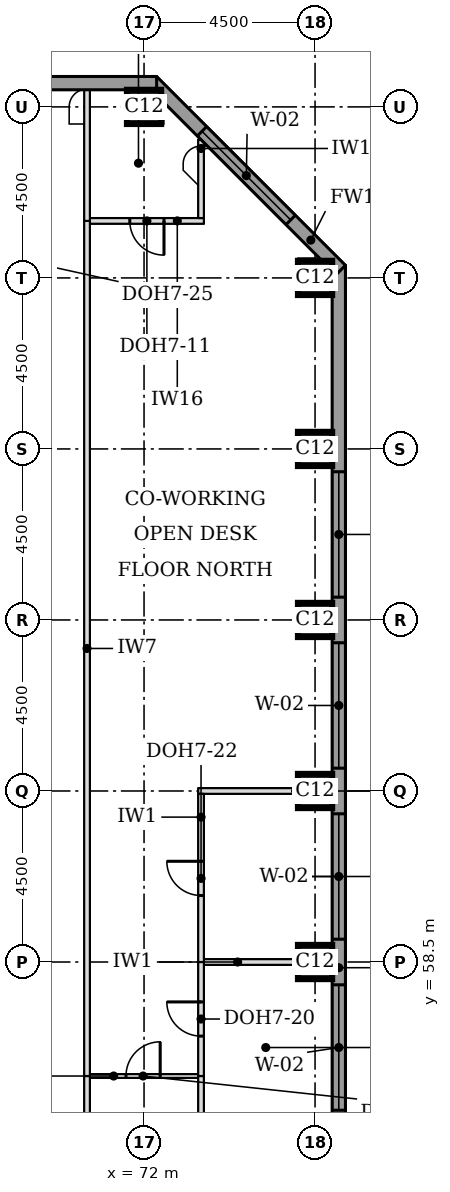
"""IFC4 building model, lengths in metres.
Left out: names, types, materials, properties, quantities, classifications, styles, units other than length and angle.
Written with IfcOpenShell. Run it as: python <this file> out.ifc"""

import sys

from ifc_helpers import new_model, si_unit, direction, frame, frame_2d, origin, origin_2d, place, context, subcontext, project, spatial, rectangle, extrude, element, fill, save


model = new_model("IFC4")
c1 = context("Model", 3, precision=1e-05, world=origin(), true_north=direction((0.0, 1.0)))
c2 = subcontext(c1, "Body", "Model", "MODEL_VIEW")
j1 = project(units=[si_unit("LENGTHUNIT", "METRE"), si_unit("PLANEANGLEUNIT", "RADIAN")], contexts=[c1])
p1 = place(None, origin())
s1 = spatial("IfcSite", under=j1, at=p1, CompositionType="ELEMENT")
p2 = place(p1, origin())
s2 = spatial("IfcBuilding", under=s1, at=p2, CompositionType="ELEMENT")
p3 = place(p2, frame((0.0, 0.0, 192.1)))
s3 = spatial("IfcBuildingStorey", under=s2, at=p3, CompositionType="ELEMENT", Elevation=192.1)
for number, where, z_axis, x_axis in (
    (1, (76.5, 58.5, 0.0), (0.0, 0.0, 1.0), (1.0, 0.0, 0.0)),
    (2, (76.5, 63.0, 0.0), (0.0, 0.0, 1.0), (1.0, 0.0, 0.0)),
    (3, (76.5, 67.5, 0.0), (0.0, 0.0, 1.0), (1.0, 0.0, 0.0)),
    (4, (76.5, 72.0, 0.0), (0.0, 0.0, 1.0), (1.0, 0.0, 0.0)),
    (5, (76.5, 76.5, 0.0), (0.0, 0.0, 1.0), (1.0, 0.0, 0.0)),
    (6, (72.0, 81.0, 0.0), (0.0, 0.0, 1.0), (1.0, 0.0, 0.0)),
):
    element("IfcColumn", number, at=place(p3, frame(where, z_axis=z_axis, x_axis=x_axis)), inside=s3, PredefinedType="COLUMN", context=c2, shape_type="SweptSolid", body=[
        extrude(rectangle(XDim=0.9, YDim=0.9, at=origin_2d()), origin(), (0.0, 0.0, 1.0), 3.7),
    ])
p4 = place(p3, frame((77.125, 44.669, 0.0), z_axis=(0.0, 0.0, 1.0), x_axis=(0.0, 1.0, 0.0)))
e7 = element("IfcWall", 7, at=p4, inside=s3, PredefinedType="STANDARD", context=c2, shape_type="SweptSolid", body=[
    extrude(rectangle(XDim=32.163, YDim=0.35, at=frame_2d((16.081, 0.0))), origin(), (0.0, 0.0, 1.0), 3.525),
])
p5 = place(p4, frame((5.431, 0.0, 0.9)))
e8 = element("IfcOpeningElement", 8, at=p5, cuts=e7, PredefinedType="OPENING", context=c2, shape_type="SweptSolid", body=[
    extrude(rectangle(XDim=3.3, YDim=1.9, at=frame_2d((1.65, 0.95))), frame((0.0, 0.185, 0.0), z_axis=(0.0, -1.0, 0.0), x_axis=(1.0, 0.0, 0.0)), (0.0, 0.0, 1.0), 0.37),
])
p6 = place(p4, frame((9.931, 0.0, 0.9)))
e9 = element("IfcOpeningElement", 9, at=p6, cuts=e7, PredefinedType="OPENING", context=c2, shape_type="SweptSolid", body=[
    extrude(rectangle(XDim=3.3, YDim=1.9, at=frame_2d((1.65, 0.95))), frame((0.0, 0.185, 0.0), z_axis=(0.0, -1.0, 0.0), x_axis=(1.0, 0.0, 0.0)), (0.0, 0.0, 1.0), 0.37),
])
p7 = place(p4, frame((14.431, 0.0, 0.9)))
e10 = element("IfcOpeningElement", 10, at=p7, cuts=e7, PredefinedType="OPENING", context=c2, shape_type="SweptSolid", body=[
    extrude(rectangle(XDim=3.3, YDim=1.9, at=frame_2d((1.65, 0.95))), frame((0.0, 0.185, 0.0), z_axis=(0.0, -1.0, 0.0), x_axis=(1.0, 0.0, 0.0)), (0.0, 0.0, 1.0), 0.37),
])
p8 = place(p4, frame((18.931, 0.0, 0.9)))
e11 = element("IfcOpeningElement", 11, at=p8, cuts=e7, PredefinedType="OPENING", context=c2, shape_type="SweptSolid", body=[
    extrude(rectangle(XDim=3.3, YDim=1.9, at=frame_2d((1.65, 0.95))), frame((0.0, 0.185, 0.0), z_axis=(0.0, -1.0, 0.0), x_axis=(1.0, 0.0, 0.0)), (0.0, 0.0, 1.0), 0.37),
])
p9 = place(p4, frame((23.431, 0.0, 0.9)))
e12 = element("IfcOpeningElement", 12, at=p9, cuts=e7, PredefinedType="OPENING", context=c2, shape_type="SweptSolid", body=[
    extrude(rectangle(XDim=3.3, YDim=1.9, at=frame_2d((1.65, 0.95))), frame((0.0, 0.185, 0.0), z_axis=(0.0, -1.0, 0.0), x_axis=(1.0, 0.0, 0.0)), (0.0, 0.0, 1.0), 0.37),
])
p10 = place(p3, frame((77.176, 76.708, 0.0), z_axis=(0.0, 0.0, 1.0), x_axis=(-0.707106781187, 0.707106781187, 0.0)))
e13 = element("IfcWall", 13, at=p10, inside=s3, PredefinedType="STANDARD", context=c2, shape_type="SweptSolid", body=[
    extrude(rectangle(XDim=7.027, YDim=0.35, at=frame_2d((3.513, 0.0))), origin(), (0.0, 0.0, 1.0), 3.525),
])
p11 = place(p10, frame((1.863, 0.0, 0.9)))
e14 = element("IfcOpeningElement", 14, at=p11, cuts=e13, PredefinedType="OPENING", context=c2, shape_type="SweptSolid", body=[
    extrude(rectangle(XDim=3.3, YDim=1.9, at=frame_2d((1.65, 0.95))), frame((0.0, 0.185, 0.0), z_axis=(0.0, -1.0, 0.0), x_axis=(1.0, 0.0, 0.0)), (0.0, 0.0, 1.0), 0.37),
])
p12 = place(p3, frame((72.331, 81.625, 0.0), z_axis=(0.0, 0.0, 1.0), x_axis=(-1.0, 0.0, 0.0)))
e15 = element("IfcWall", 15, at=p12, inside=s3, PredefinedType="STANDARD", context=c2, shape_type="SweptSolid", body=[
    extrude(rectangle(XDim=32.163, YDim=0.35, at=frame_2d((16.081, 0.0))), origin(), (0.0, 0.0, 1.0), 3.525),
])
p13 = place(p12, frame((5.431, 0.0, 0.9)))
e16 = element("IfcOpeningElement", 16, at=p13, cuts=e15, PredefinedType="OPENING", context=c2, shape_type="SweptSolid", body=[
    extrude(rectangle(XDim=3.3, YDim=1.9, at=frame_2d((1.65, 0.95))), frame((0.0, 0.185, 0.0), z_axis=(0.0, -1.0, 0.0), x_axis=(1.0, 0.0, 0.0)), (0.0, 0.0, 1.0), 0.37),
])
p14 = place(p12, frame((9.931, 0.0, 0.9)))
e17 = element("IfcOpeningElement", 17, at=p14, cuts=e15, PredefinedType="OPENING", context=c2, shape_type="SweptSolid", body=[
    extrude(rectangle(XDim=3.3, YDim=1.9, at=frame_2d((1.65, 0.95))), frame((0.0, 0.185, 0.0), z_axis=(0.0, -1.0, 0.0), x_axis=(1.0, 0.0, 0.0)), (0.0, 0.0, 1.0), 0.37),
])
p15 = place(p12, frame((14.431, 0.0, 0.9)))
e18 = element("IfcOpeningElement", 18, at=p15, cuts=e15, PredefinedType="OPENING", context=c2, shape_type="SweptSolid", body=[
    extrude(rectangle(XDim=3.3, YDim=1.9, at=frame_2d((1.65, 0.95))), frame((0.0, 0.185, 0.0), z_axis=(0.0, -1.0, 0.0), x_axis=(1.0, 0.0, 0.0)), (0.0, 0.0, 1.0), 0.37),
])
p16 = place(p12, frame((18.931, 0.0, 0.9)))
e19 = element("IfcOpeningElement", 19, at=p16, cuts=e15, PredefinedType="OPENING", context=c2, shape_type="SweptSolid", body=[
    extrude(rectangle(XDim=3.3, YDim=1.9, at=frame_2d((1.65, 0.95))), frame((0.0, 0.185, 0.0), z_axis=(0.0, -1.0, 0.0), x_axis=(1.0, 0.0, 0.0)), (0.0, 0.0, 1.0), 0.37),
])
p17 = place(p12, frame((23.431, 0.0, 0.9)))
e20 = element("IfcOpeningElement", 20, at=p17, cuts=e15, PredefinedType="OPENING", context=c2, shape_type="SweptSolid", body=[
    extrude(rectangle(XDim=3.3, YDim=1.9, at=frame_2d((1.65, 0.95))), frame((0.0, 0.185, 0.0), z_axis=(0.0, -1.0, 0.0), x_axis=(1.0, 0.0, 0.0)), (0.0, 0.0, 1.0), 0.37),
])
p18 = place(p3, frame((70.575, 55.5, 0.0), z_axis=(0.0, 0.0, 1.0), x_axis=(1.0, 0.0, 0.0)))
e21 = element("IfcWall", 21, at=p18, inside=s3, PredefinedType="PARTITIONING", context=c2, shape_type="SweptSolid", body=[
    extrude(rectangle(XDim=2.85, YDim=0.1, at=frame_2d((1.425, 0.0))), origin(), (0.0, 0.0, 1.0), 3.55),
])
p19 = place(p18, frame((0.95, 0.0, 0.0)))
e22 = element("IfcOpeningElement", 22, at=p19, cuts=e21, PredefinedType="OPENING", context=c2, shape_type="SweptSolid", body=[
    extrude(rectangle(XDim=0.9, YDim=2.1, at=frame_2d((0.45, 1.05))), frame((0.0, 0.06, 0.0), z_axis=(0.0, -1.0, 0.0), x_axis=(1.0, 0.0, 0.0)), (0.0, 0.0, 1.0), 0.12),
])
p20 = place(p3, frame((73.575, 58.5, 0.0), z_axis=(0.0, 0.0, 1.0), x_axis=(1.0, 0.0, 0.0)))
e23 = element("IfcWall", 23, at=p20, inside=s3, PredefinedType="PARTITIONING", context=c2, shape_type="SweptSolid", body=[
    extrude(rectangle(XDim=3.375, YDim=0.15, at=frame_2d((1.688, 0.0))), origin(), (0.0, 0.0, 1.0), 3.55),
])
p21 = place(p3, frame((73.425, 63.0, 0.0), z_axis=(0.0, 0.0, 1.0), x_axis=(1.0, 0.0, 0.0)))
e24 = element("IfcWall", 24, at=p21, inside=s3, PredefinedType="PARTITIONING", context=c2, shape_type="SweptSolid", body=[
    extrude(rectangle(XDim=3.525, YDim=0.15, at=frame_2d((1.762, 0.0))), origin(), (0.0, 0.0, 1.0), 3.55),
])
p22 = place(p3, frame((70.575, 78.0, 0.0), z_axis=(0.0, 0.0, 1.0), x_axis=(1.0, 0.0, 0.0)))
e25 = element("IfcWall", 25, at=p22, inside=s3, PredefinedType="PARTITIONING", context=c2, shape_type="SweptSolid", body=[
    extrude(rectangle(XDim=3.0, YDim=0.15, at=frame_2d((1.5, 0.0))), origin(), (0.0, 0.0, 1.0), 3.55),
])
p23 = place(p22, frame((1.05, 0.0, 0.0)))
e26 = element("IfcOpeningElement", 26, at=p23, cuts=e25, PredefinedType="OPENING", context=c2, shape_type="SweptSolid", body=[
    extrude(rectangle(XDim=0.9, YDim=2.1, at=frame_2d((0.45, 1.05))), frame((0.0, 0.085, 0.0), z_axis=(0.0, -1.0, 0.0), x_axis=(1.0, 0.0, 0.0)), (0.0, 0.0, 1.0), 0.17),
])
p24 = place(p3, frame((70.5, 51.0, 0.0), z_axis=(0.0, 0.0, 1.0), x_axis=(0.0, 1.0, 0.0)))
e27 = element("IfcWall", 27, at=p24, inside=s3, PredefinedType="PARTITIONING", context=c2, shape_type="SweptSolid", body=[
    extrude(rectangle(XDim=4.5, YDim=0.15, at=frame_2d((2.25, 0.0))), origin(), (0.0, 0.0, 1.0), 3.55),
])
p25 = place(p24, frame((1.75, 0.0, 0.0)))
e28 = element("IfcOpeningElement", 28, at=p25, cuts=e27, PredefinedType="OPENING", context=c2, shape_type="SweptSolid", body=[
    extrude(rectangle(XDim=1.0, YDim=2.1, at=frame_2d((0.5, 1.05))), frame((0.0, 0.085, 0.0), z_axis=(0.0, -1.0, 0.0), x_axis=(1.0, 0.0, 0.0)), (0.0, 0.0, 1.0), 0.17),
])
p26 = place(p3, frame((73.5, 54.075, 0.0), z_axis=(0.0, 0.0, 1.0), x_axis=(0.0, 1.0, 0.0)))
e29 = element("IfcWall", 29, at=p26, inside=s3, PredefinedType="PARTITIONING", context=c2, shape_type="SweptSolid", body=[
    extrude(rectangle(XDim=1.425, YDim=0.15, at=frame_2d((0.712, 0.0))), origin(), (0.0, 0.0, 1.0), 3.55),
])
p27 = place(p3, frame((70.5, 55.5, 0.0), z_axis=(0.0, 0.0, 1.0), x_axis=(0.0, 1.0, 0.0)))
e30 = element("IfcWall", 30, at=p27, inside=s3, PredefinedType="PARTITIONING", context=c2, shape_type="SweptSolid", body=[
    extrude(rectangle(XDim=22.5, YDim=0.15, at=frame_2d((11.25, 0.0))), origin(), (0.0, 0.0, 1.0), 3.55),
])
p28 = place(p3, frame((73.5, 55.5, 0.0), z_axis=(0.0, 0.0, 1.0), x_axis=(0.0, 1.0, 0.0)))
e31 = element("IfcWall", 31, at=p28, inside=s3, PredefinedType="PARTITIONING", context=c2, shape_type="SweptSolid", body=[
    extrude(rectangle(XDim=3.0, YDim=0.15, at=frame_2d((1.5, 0.0))), origin(), (0.0, 0.0, 1.0), 3.55),
])
p29 = place(p28, frame((1.05, 0.0, 0.0)))
e32 = element("IfcOpeningElement", 32, at=p29, cuts=e31, PredefinedType="OPENING", context=c2, shape_type="SweptSolid", body=[
    extrude(rectangle(XDim=0.9, YDim=2.1, at=frame_2d((0.45, 1.05))), frame((0.0, 0.085, 0.0), z_axis=(0.0, -1.0, 0.0), x_axis=(1.0, 0.0, 0.0)), (0.0, 0.0, 1.0), 0.17),
])
p30 = place(p3, frame((73.5, 58.5, 0.0), z_axis=(0.0, 0.0, 1.0), x_axis=(0.0, 1.0, 0.0)))
e33 = element("IfcWall", 33, at=p30, inside=s3, PredefinedType="PARTITIONING", context=c2, shape_type="SweptSolid", body=[
    extrude(rectangle(XDim=4.425, YDim=0.15, at=frame_2d((2.212, 0.0))), origin(), (0.0, 0.0, 1.0), 3.55),
])
p31 = place(p30, frame((1.75, 0.0, 0.0)))
e34 = element("IfcOpeningElement", 34, at=p31, cuts=e33, PredefinedType="OPENING", context=c2, shape_type="SweptSolid", body=[
    extrude(rectangle(XDim=0.9, YDim=2.1, at=frame_2d((0.45, 1.05))), frame((0.0, 0.085, 0.0), z_axis=(0.0, -1.0, 0.0), x_axis=(1.0, 0.0, 0.0)), (0.0, 0.0, 1.0), 0.17),
])
p32 = place(p3, frame((70.5, 78.0, 0.0), z_axis=(0.0, 0.0, 1.0), x_axis=(0.0, 1.0, 0.0)))
e35 = element("IfcWall", 35, at=p32, inside=s3, PredefinedType="PARTITIONING", context=c2, shape_type="SweptSolid", body=[
    extrude(rectangle(XDim=3.45, YDim=0.15, at=frame_2d((1.725, 0.0))), origin(), (0.0, 0.0, 1.0), 3.55),
])
p33 = place(p3, frame((73.5, 78.075, 0.0), z_axis=(0.0, 0.0, 1.0), x_axis=(0.0, 1.0, 0.0)))
e36 = element("IfcWall", 36, at=p33, inside=s3, PredefinedType="PARTITIONING", context=c2, shape_type="SweptSolid", body=[
    extrude(rectangle(XDim=2.062, YDim=0.15, at=frame_2d((1.031, 0.0))), origin(), (0.0, 0.0, 1.0), 3.55),
])
p34 = place(p6, origin())
e37 = element("IfcWindow", 37, at=p34, inside=s3, PartitioningType="SINGLE_PANEL", PredefinedType="WINDOW", context=c2, shape_type="SweptSolid", body=[
    extrude(rectangle(XDim=3.3, YDim=1.9, at=frame_2d((1.65, 0.95))), frame((0.0, 0.085, 0.0), z_axis=(0.0, -1.0, 0.0), x_axis=(1.0, 0.0, 0.0)), (0.0, 0.0, 1.0), 0.06),
])
fill(e9, e37)
p35 = place(p7, origin())
e38 = element("IfcWindow", 38, at=p35, inside=s3, PartitioningType="SINGLE_PANEL", PredefinedType="WINDOW", context=c2, shape_type="SweptSolid", body=[
    extrude(rectangle(XDim=3.3, YDim=1.9, at=frame_2d((1.65, 0.95))), frame((0.0, 0.085, 0.0), z_axis=(0.0, -1.0, 0.0), x_axis=(1.0, 0.0, 0.0)), (0.0, 0.0, 1.0), 0.06),
])
fill(e10, e38)
p36 = place(p8, origin())
e39 = element("IfcWindow", 39, at=p36, inside=s3, PartitioningType="SINGLE_PANEL", PredefinedType="WINDOW", context=c2, shape_type="SweptSolid", body=[
    extrude(rectangle(XDim=3.3, YDim=1.9, at=frame_2d((1.65, 0.95))), frame((0.0, 0.085, 0.0), z_axis=(0.0, -1.0, 0.0), x_axis=(1.0, 0.0, 0.0)), (0.0, 0.0, 1.0), 0.06),
])
fill(e11, e39)
p37 = place(p9, origin())
e40 = element("IfcWindow", 40, at=p37, inside=s3, PartitioningType="SINGLE_PANEL", PredefinedType="WINDOW", context=c2, shape_type="SweptSolid", body=[
    extrude(rectangle(XDim=3.3, YDim=1.9, at=frame_2d((1.65, 0.95))), frame((0.0, 0.085, 0.0), z_axis=(0.0, -1.0, 0.0), x_axis=(1.0, 0.0, 0.0)), (0.0, 0.0, 1.0), 0.06),
])
fill(e12, e40)
p38 = place(p11, origin())
e41 = element("IfcWindow", 41, at=p38, inside=s3, PartitioningType="SINGLE_PANEL", PredefinedType="WINDOW", context=c2, shape_type="SweptSolid", body=[
    extrude(rectangle(XDim=3.3, YDim=1.9, at=frame_2d((1.65, 0.95))), frame((0.0, 0.085, 0.0), z_axis=(0.0, -1.0, 0.0), x_axis=(1.0, 0.0, 0.0)), (0.0, 0.0, 1.0), 0.06),
])
fill(e14, e41)
p39 = place(p19, origin())
e42 = element("IfcDoor", 42, at=p39, inside=s3, OperationType="SINGLE_SWING_RIGHT", PredefinedType="DOOR", context=c2, shape_type="SweptSolid", body=[
    extrude(rectangle(XDim=0.9, YDim=2.1, at=frame_2d((0.45, 1.05))), frame((0.0, 0.025, 0.0), z_axis=(0.0, -1.0, 0.0), x_axis=(1.0, 0.0, 0.0)), (0.0, 0.0, 1.0), 0.05),
])
fill(e22, e42)
p40 = place(p29, origin())
e43 = element("IfcDoor", 43, at=p40, inside=s3, OperationType="SINGLE_SWING_RIGHT", PredefinedType="DOOR", context=c2, shape_type="SweptSolid", body=[
    extrude(rectangle(XDim=0.9, YDim=2.1, at=frame_2d((0.45, 1.05))), frame((0.0, 0.025, 0.0), z_axis=(0.0, -1.0, 0.0), x_axis=(1.0, 0.0, 0.0)), (0.0, 0.0, 1.0), 0.05),
])
fill(e32, e43)
p41 = place(p31, origin())
e44 = element("IfcDoor", 44, at=p41, inside=s3, OperationType="SINGLE_SWING_RIGHT", PredefinedType="DOOR", context=c2, shape_type="SweptSolid", body=[
    extrude(rectangle(XDim=0.9, YDim=2.1, at=frame_2d((0.45, 1.05))), frame((0.0, 0.025, 0.0), z_axis=(0.0, -1.0, 0.0), x_axis=(1.0, 0.0, 0.0)), (0.0, 0.0, 1.0), 0.05),
])
fill(e34, e44)
p42 = place(p23, frame((0.9, 0.0, 0.0), z_axis=(0.0, 0.0, 1.0), x_axis=(-1.0, 0.0, 0.0)))
e45 = element("IfcDoor", 45, at=p42, inside=s3, OperationType="SINGLE_SWING_LEFT", PredefinedType="DOOR", context=c2, shape_type="SweptSolid", body=[
    extrude(rectangle(XDim=0.9, YDim=2.1, at=frame_2d((0.45, 1.05))), frame((0.0, 0.025, 0.0), z_axis=(0.0, -1.0, 0.0), x_axis=(1.0, 0.0, 0.0)), (0.0, 0.0, 1.0), 0.05),
])
fill(e26, e45)
save(model, sys.argv[1])
